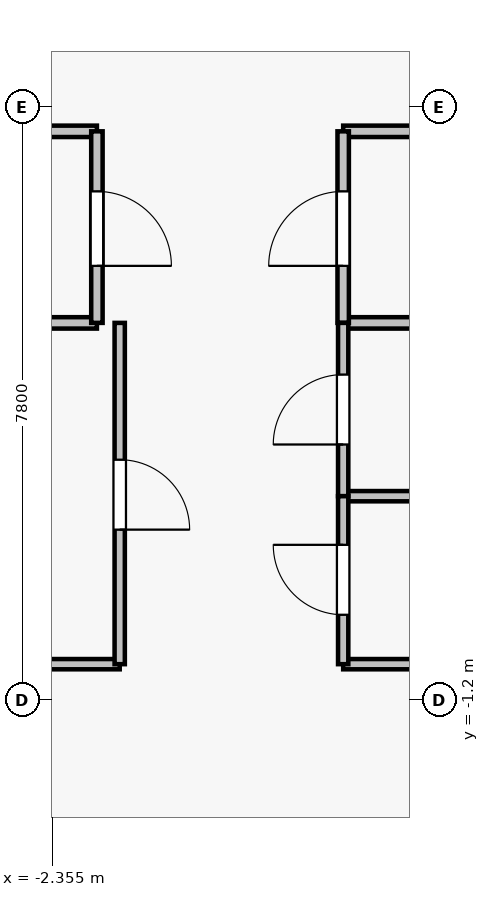
"""IFC4 building model, lengths in metres.
Left out: names, types, materials, properties, quantities, classifications, styles, units other than length and angle.
Written with IfcOpenShell. Run it as: python <this file> out.ifc"""

import sys

from ifc_helpers import new_model, si_unit, direction, frame, frame_2d, origin, place, context, subcontext, project, spatial, rectangle, extrude, source, transform, mapped, element, fill, save


model = new_model("IFC4")
c1 = context("Model", 3, precision=1e-05, world=origin(), true_north=direction((0.0, 1.0)))
c2 = subcontext(c1, "Body", "Model", "MODEL_VIEW")
j1 = project(units=[si_unit("LENGTHUNIT", "METRE"), si_unit("PLANEANGLEUNIT", "RADIAN")], contexts=[c1])
p1 = place(None, origin())
s1 = spatial("IfcSite", under=j1, at=p1, CompositionType="ELEMENT")
p2 = place(p1, origin())
s2 = spatial("IfcBuilding", under=s1, at=p2, CompositionType="ELEMENT")
p3 = place(p2, frame((0.0, 0.0, 265.0)))
s3 = spatial("IfcBuildingStorey", under=s2, at=p3, CompositionType="ELEMENT", Elevation=265.0)
for number, where, z_axis, x_axis in (
    (1, (-1.77, 3.76, 0.0), (0.0, 0.0, 1.0), (-1.0, 0.0, 0.0)),
    (2, (-6.18, 6.28, 0.0), (0.0, 0.0, 1.0), (1.0, 0.0, 0.0)),
):
    element("IfcWall", number, at=place(p3, frame(where, z_axis=z_axis, x_axis=x_axis)), inside=s3, PredefinedType="PARTITIONING", context=c2, shape_type="SweptSolid", body=[
        extrude(rectangle(XDim=4.41, YDim=0.15, at=frame_2d((2.205, 0.0))), origin(), (0.0, 0.0, 1.0), 3.075),
    ])
p4 = place(p3, frame((-1.77, 6.28, 0.0), z_axis=(0.0, 0.0, 1.0), x_axis=(0.0, -1.0, 0.0)))
e3 = element("IfcWall", 3, at=p4, inside=s3, PredefinedType="PARTITIONING", context=c2, shape_type="SweptSolid", body=[
    extrude(rectangle(XDim=2.52, YDim=0.15, at=frame_2d((1.26, 0.0))), origin(), (0.0, 0.0, 1.0), 3.075),
])
p5 = place(p4, frame((0.79, 0.0, 0.0)))
e4 = element("IfcOpeningElement", 4, at=p5, cuts=e3, PredefinedType="OPENING", context=c2, shape_type="SweptSolid", body=[
    extrude(rectangle(XDim=0.98, YDim=2.15, at=frame_2d((0.49, 1.075))), frame((0.0, 0.085, 0.0), z_axis=(0.0, -1.0, 0.0), x_axis=(1.0, 0.0, 0.0)), (0.0, 0.0, 1.0), 0.17),
])
for number, where, z_axis, x_axis in (
    (5, (6.38, 3.76, 0.0), (0.0, 0.0, 1.0), (-1.0, 0.0, 0.0)),
    (6, (1.47, 6.28, 0.0), (0.0, 0.0, 1.0), (1.0, 0.0, 0.0)),
):
    element("IfcWall", number, at=place(p3, frame(where, z_axis=z_axis, x_axis=x_axis)), inside=s3, PredefinedType="PARTITIONING", context=c2, shape_type="SweptSolid", body=[
        extrude(rectangle(XDim=4.91, YDim=0.15, at=frame_2d((2.455, 0.0))), origin(), (0.0, 0.0, 1.0), 3.075),
    ])
p6 = place(p3, frame((1.47, 3.76, 0.0), z_axis=(0.0, 0.0, 1.0), x_axis=(0.0, 1.0, 0.0)))
e7 = element("IfcWall", 7, at=p6, inside=s3, PredefinedType="PARTITIONING", context=c2, shape_type="SweptSolid", body=[
    extrude(rectangle(XDim=2.52, YDim=0.15, at=frame_2d((1.26, 0.0))), origin(), (0.0, 0.0, 1.0), 3.075),
])
p7 = place(p6, frame((0.75, 0.0, 0.0)))
e8 = element("IfcOpeningElement", 8, at=p7, cuts=e7, PredefinedType="OPENING", context=c2, shape_type="SweptSolid", body=[
    extrude(rectangle(XDim=0.98, YDim=2.15, at=frame_2d((0.49, 1.075))), frame((0.0, 0.085, 0.0), z_axis=(0.0, -1.0, 0.0), x_axis=(1.0, 0.0, 0.0)), (0.0, 0.0, 1.0), 0.17),
])
p8 = place(p3, frame((-1.47, -0.73, 0.0), z_axis=(0.0, 0.0, 1.0), x_axis=(-1.0, 0.0, 0.0)))
e9 = element("IfcWall", 9, at=p8, inside=s3, PredefinedType="PARTITIONING", context=c2, shape_type="SweptSolid", body=[
    extrude(rectangle(XDim=5.11, YDim=0.135, at=frame_2d((2.555, 0.0))), origin(), (0.0, 0.0, 1.0), 3.075),
])
p9 = place(p3, frame((-1.47, 3.76, 0.0), z_axis=(0.0, 0.0, 1.0), x_axis=(0.0, -1.0, 0.0)))
e10 = element("IfcWall", 10, at=p9, inside=s3, PredefinedType="PARTITIONING", context=c2, shape_type="SweptSolid", body=[
    extrude(rectangle(XDim=4.49, YDim=0.135, at=frame_2d((2.245, 0.0))), origin(), (0.0, 0.0, 1.0), 3.075),
])
p10 = place(p9, frame((1.8, 0.0, 0.0)))
e11 = element("IfcOpeningElement", 11, at=p10, cuts=e10, PredefinedType="OPENING", context=c2, shape_type="SweptSolid", body=[
    extrude(rectangle(XDim=0.92, YDim=2.1, at=frame_2d((0.46, 1.05))), frame((0.0, 0.077, 0.0), z_axis=(0.0, -1.0, 0.0), x_axis=(1.0, 0.0, 0.0)), (0.0, 0.0, 1.0), 0.155),
])
p11 = place(p3, frame((6.58, 1.48, 0.0), z_axis=(0.0, 0.0, 1.0), x_axis=(-1.0, 0.0, 0.0)))
e12 = element("IfcWall", 12, at=p11, inside=s3, PredefinedType="PARTITIONING", context=c2, shape_type="SweptSolid", body=[
    extrude(rectangle(XDim=5.11, YDim=0.135, at=frame_2d((2.555, 0.0))), origin(), (0.0, 0.0, 1.0), 3.075),
])
p12 = place(p3, frame((1.47, 1.48, 0.0), z_axis=(0.0, 0.0, 1.0), x_axis=(0.0, 1.0, 0.0)))
e13 = element("IfcWall", 13, at=p12, inside=s3, PredefinedType="PARTITIONING", context=c2, shape_type="SweptSolid", body=[
    extrude(rectangle(XDim=2.28, YDim=0.135, at=frame_2d((1.14, 0.0))), origin(), (0.0, 0.0, 1.0), 3.075),
])
p13 = place(p12, frame((0.68, 0.0, 0.0)))
e14 = element("IfcOpeningElement", 14, at=p13, cuts=e13, PredefinedType="OPENING", context=c2, shape_type="SweptSolid", body=[
    extrude(rectangle(XDim=0.92, YDim=2.1, at=frame_2d((0.46, 1.05))), frame((0.0, 0.077, 0.0), z_axis=(0.0, -1.0, 0.0), x_axis=(1.0, 0.0, 0.0)), (0.0, 0.0, 1.0), 0.155),
])
p14 = place(p3, frame((4.18, -0.73, 0.0), z_axis=(0.0, 0.0, 1.0), x_axis=(-1.0, 0.0, 0.0)))
e15 = element("IfcWall", 15, at=p14, inside=s3, PredefinedType="PARTITIONING", context=c2, shape_type="SweptSolid", body=[
    extrude(rectangle(XDim=2.71, YDim=0.135, at=frame_2d((1.355, 0.0))), origin(), (0.0, 0.0, 1.0), 3.075),
])
p15 = place(p3, frame((1.47, -0.73, 0.0), z_axis=(0.0, 0.0, 1.0), x_axis=(0.0, 1.0, 0.0)))
e16 = element("IfcWall", 16, at=p15, inside=s3, PredefinedType="PARTITIONING", context=c2, shape_type="SweptSolid", body=[
    extrude(rectangle(XDim=2.21, YDim=0.135, at=frame_2d((1.105, 0.0))), origin(), (0.0, 0.0, 1.0), 3.075),
])
p16 = place(p15, frame((0.65, 0.0, 0.0)))
e17 = element("IfcOpeningElement", 17, at=p16, cuts=e16, PredefinedType="OPENING", context=c2, shape_type="SweptSolid", body=[
    extrude(rectangle(XDim=0.92, YDim=2.1, at=frame_2d((0.46, 1.05))), frame((0.0, 0.077, 0.0), z_axis=(0.0, -1.0, 0.0), x_axis=(1.0, 0.0, 0.0)), (0.0, 0.0, 1.0), 0.155),
])
m1 = source(origin(), c2, "Body", "SweptSolid", [
    extrude(rectangle(XDim=0.98, YDim=2.15, at=frame_2d((0.49, 1.075))), frame((0.0, 0.025, 0.0), z_axis=(0.0, -1.0, 0.0), x_axis=(1.0, 0.0, 0.0)), (0.0, 0.0, 1.0), 0.05),
])
p17 = place(p5, origin())
e18 = element("IfcDoor", 18, at=p17, inside=s3, OperationType="SINGLE_SWING_RIGHT", PredefinedType="DOOR", context=c2, shape_type="MappedRepresentation", body=[
    mapped(m1, transform((0.0, 0.0, 0.0), x_axis=(1.0, 0.0, 0.0), y_axis=(0.0, 1.0, 0.0), z_axis=(0.0, 0.0, 1.0), scale=1.0)),
])
fill(e4, e18)
p18 = place(p7, origin())
e19 = element("IfcDoor", 19, at=p18, inside=s3, OperationType="SINGLE_SWING_LEFT", PredefinedType="DOOR", context=c2, shape_type="MappedRepresentation", body=[
    mapped(m1, transform((0.0, 0.0, 0.0), x_axis=(1.0, 0.0, 0.0), y_axis=(0.0, 1.0, 0.0), z_axis=(0.0, 0.0, 1.0), scale=1.0)),
])
fill(e8, e19)
m2 = source(origin(), c2, "Body", "SweptSolid", [
    extrude(rectangle(XDim=0.92, YDim=2.1, at=frame_2d((0.46, 1.05))), frame((0.0, 0.025, 0.0), z_axis=(0.0, -1.0, 0.0), x_axis=(1.0, 0.0, 0.0)), (0.0, 0.0, 1.0), 0.05),
])
p19 = place(p10, origin())
e20 = element("IfcDoor", 20, at=p19, inside=s3, OperationType="SINGLE_SWING_RIGHT", PredefinedType="DOOR", context=c2, shape_type="MappedRepresentation", body=[
    mapped(m2, transform((0.0, 0.0, 0.0), x_axis=(1.0, 0.0, 0.0), y_axis=(0.0, 1.0, 0.0), z_axis=(0.0, 0.0, 1.0), scale=1.0)),
])
fill(e11, e20)
p20 = place(p13, origin())
e21 = element("IfcDoor", 21, at=p20, inside=s3, OperationType="SINGLE_SWING_LEFT", PredefinedType="DOOR", context=c2, shape_type="MappedRepresentation", body=[
    mapped(m2, transform((0.0, 0.0, 0.0), x_axis=(1.0, 0.0, 0.0), y_axis=(0.0, 1.0, 0.0), z_axis=(0.0, 0.0, 1.0), scale=1.0)),
])
fill(e14, e21)
p21 = place(p16, origin())
e22 = element("IfcDoor", 22, at=p21, inside=s3, OperationType="SINGLE_SWING_RIGHT", PredefinedType="DOOR", context=c2, shape_type="MappedRepresentation", body=[
    mapped(m2, transform((0.0, 0.0, 0.0), x_axis=(1.0, 0.0, 0.0), y_axis=(0.0, 1.0, 0.0), z_axis=(0.0, 0.0, 1.0), scale=1.0)),
])
fill(e17, e22)
save(model, sys.argv[1])
